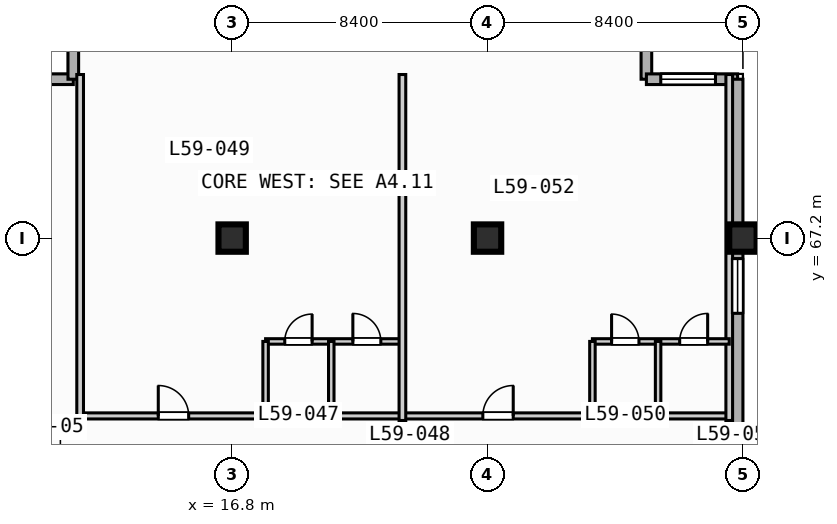
"""IFC4 building model, lengths in metres.
Left out: names, types, materials, properties, quantities, classifications, styles, units other than length and angle.
Written with IfcOpenShell. Run it as: python <this file> out.ifc"""

import sys

from ifc_helpers import new_model, si_unit, direction, frame, frame_2d, origin, origin_2d, place, context, subcontext, project, spatial, rectangle, extrude, element, fill, save


model = new_model("IFC4")
c1 = context("Model", 3, precision=1e-05, world=origin(), true_north=direction((0.0, 1.0)))
c2 = subcontext(c1, "Body", "Model", "MODEL_VIEW")
j1 = project(units=[si_unit("LENGTHUNIT", "METRE"), si_unit("PLANEANGLEUNIT", "RADIAN")], contexts=[c1])
p1 = place(None, origin())
s1 = spatial("IfcSite", under=j1, at=p1, CompositionType="ELEMENT")
p2 = place(p1, origin())
s2 = spatial("IfcBuilding", under=s1, at=p2, CompositionType="ELEMENT")
p3 = place(p2, frame((0.0, 0.0, 241.6)))
s3 = spatial("IfcBuildingStorey", under=s2, at=p3, CompositionType="ELEMENT", Elevation=241.6)
for number, where, z_axis, x_axis in (
    (1, (16.8, 67.2, 0.0), (0.0, 0.0, 1.0), (1.0, 0.0, 0.0)),
    (2, (25.2, 67.2, 0.0), (0.0, 0.0, 1.0), (1.0, 0.0, 0.0)),
    (3, (33.6, 67.2, 0.0), (0.0, 0.0, 1.0), (1.0, 0.0, 0.0)),
):
    element("IfcColumn", number, at=place(p3, frame(where, z_axis=z_axis, x_axis=x_axis)), inside=s3, PredefinedType="COLUMN", context=c2, shape_type="SweptSolid", body=[
        extrude(rectangle(XDim=0.9, YDim=0.9, at=origin_2d()), origin(), (0.0, 0.0, 1.0), 3.7),
    ])
for number, where, z_axis, x_axis in (
    (4, (8.575, 72.425, 0.0), (0.0, 0.0, 1.0), (1.0, 0.0, 0.0)),
    (5, (11.575, 72.425, 0.0), (0.0, 0.0, 1.0), (0.0, 1.0, 0.0)),
    (6, (30.425, 75.425, 0.0), (0.0, 0.0, 1.0), (0.0, -1.0, 0.0)),
):
    element("IfcWall", number, at=place(p3, frame(where, z_axis=z_axis, x_axis=x_axis)), inside=s3, PredefinedType="STANDARD", context=c2, shape_type="SweptSolid", body=[
        extrude(rectangle(XDim=3.0, YDim=0.35, at=frame_2d((1.5, 0.0))), origin(), (0.0, 0.0, 1.0), 3.47),
    ])
p4 = place(p3, frame((30.425, 72.425, 0.0), z_axis=(0.0, 0.0, 1.0), x_axis=(1.0, 0.0, 0.0)))
e7 = element("IfcWall", 7, at=p4, inside=s3, PredefinedType="STANDARD", context=c2, shape_type="SweptSolid", body=[
    extrude(rectangle(XDim=3.0, YDim=0.35, at=frame_2d((1.5, 0.0))), origin(), (0.0, 0.0, 1.0), 3.47),
])
p5 = place(p4, frame((0.472, 0.0, 0.85)))
e8 = element("IfcOpeningElement", 8, at=p5, cuts=e7, PredefinedType="OPENING", context=c2, shape_type="SweptSolid", body=[
    extrude(rectangle(XDim=1.8, YDim=1.8, at=frame_2d((0.9, 0.9))), frame((0.0, 0.185, 0.0), z_axis=(0.0, -1.0, 0.0), x_axis=(1.0, 0.0, 0.0)), (0.0, 0.0, 1.0), 0.37),
])
p6 = place(p3, frame((33.425, 72.425, 0.0), z_axis=(0.0, 0.0, 1.0), x_axis=(0.0, -1.0, 0.0)))
e9 = element("IfcWall", 9, at=p6, inside=s3, PredefinedType="STANDARD", context=c2, shape_type="SweptSolid", body=[
    extrude(rectangle(XDim=39.0, YDim=0.35, at=frame_2d((19.5, 0.0))), origin(), (0.0, 0.0, 1.0), 3.47),
])
p7 = place(p6, frame((5.9, 0.0, 0.85)))
e10 = element("IfcOpeningElement", 10, at=p7, cuts=e9, PredefinedType="OPENING", context=c2, shape_type="SweptSolid", body=[
    extrude(rectangle(XDim=1.8, YDim=1.8, at=frame_2d((0.9, 0.9))), frame((0.0, 0.185, 0.0), z_axis=(0.0, -1.0, 0.0), x_axis=(1.0, 0.0, 0.0)), (0.0, 0.0, 1.0), 0.37),
])
p8 = place(p3, frame((11.8, 61.35, 0.0), z_axis=(0.0, 0.0, 1.0), x_axis=(1.0, 0.0, 0.0)))
e11 = element("IfcWall", 11, at=p8, inside=s3, PredefinedType="PARTITIONING", context=c2, shape_type="SweptSolid", body=[
    extrude(rectangle(XDim=21.35, YDim=0.2, at=frame_2d((10.675, 0.0))), origin(), (0.0, 0.0, 1.0), 3.47),
])
p9 = place(p8, frame((2.57, 0.0, 0.0)))
e12 = element("IfcOpeningElement", 12, at=p9, cuts=e11, PredefinedType="OPENING", context=c2, shape_type="SweptSolid", body=[
    extrude(rectangle(XDim=1.0, YDim=2.15, at=frame_2d((0.5, 1.075))), frame((0.0, 0.11, 0.0), z_axis=(0.0, -1.0, 0.0), x_axis=(1.0, 0.0, 0.0)), (0.0, 0.0, 1.0), 0.22),
])
p10 = place(p8, frame((13.245, 0.0, 0.0)))
e13 = element("IfcOpeningElement", 13, at=p10, cuts=e11, PredefinedType="OPENING", context=c2, shape_type="SweptSolid", body=[
    extrude(rectangle(XDim=1.0, YDim=2.15, at=frame_2d((0.5, 1.075))), frame((0.0, 0.11, 0.0), z_axis=(0.0, -1.0, 0.0), x_axis=(1.0, 0.0, 0.0)), (0.0, 0.0, 1.0), 0.22),
])
p11 = place(p3, frame((11.8, 61.2, 0.0), z_axis=(0.0, 0.0, 1.0), x_axis=(0.0, 1.0, 0.0)))
e14 = element("IfcWall", 14, at=p11, inside=s3, PredefinedType="PARTITIONING", context=c2, shape_type="SweptSolid", body=[
    extrude(rectangle(XDim=11.38, YDim=0.22, at=frame_2d((5.69, 0.0))), origin(), (0.0, 0.0, 1.0), 3.47),
])
p12 = place(p3, frame((17.9, 63.8, 0.0), z_axis=(0.0, 0.0, 1.0), x_axis=(1.0, 0.0, 0.0)))
e15 = element("IfcWall", 15, at=p12, inside=s3, PredefinedType="PLUMBINGWALL", context=c2, shape_type="SweptSolid", body=[
    extrude(rectangle(XDim=4.5, YDim=0.18, at=frame_2d((2.25, 0.0))), origin(), (0.0, 0.0, 1.0), 3.47),
])
p13 = place(p12, frame((0.63, 0.0, 0.0)))
e16 = element("IfcOpeningElement", 16, at=p13, cuts=e15, PredefinedType="OPENING", context=c2, shape_type="SweptSolid", body=[
    extrude(rectangle(XDim=0.9, YDim=2.1, at=frame_2d((0.45, 1.05))), frame((0.0, 0.1, 0.0), z_axis=(0.0, -1.0, 0.0), x_axis=(1.0, 0.0, 0.0)), (0.0, 0.0, 1.0), 0.2),
])
p14 = place(p12, frame((2.87, 0.0, 0.0)))
e17 = element("IfcOpeningElement", 17, at=p14, cuts=e15, PredefinedType="OPENING", context=c2, shape_type="SweptSolid", body=[
    extrude(rectangle(XDim=0.92, YDim=2.1, at=frame_2d((0.46, 1.05))), frame((0.0, 0.1, 0.0), z_axis=(0.0, -1.0, 0.0), x_axis=(1.0, 0.0, 0.0)), (0.0, 0.0, 1.0), 0.2),
])
for number, where, z_axis, x_axis in (
    (18, (17.9, 61.35, 0.0), (0.0, 0.0, 1.0), (0.0, 1.0, 0.0)),
    (19, (20.06, 61.35, 0.0), (0.0, 0.0, 1.0), (0.0, 1.0, 0.0)),
):
    element("IfcWall", number, at=place(p3, frame(where, z_axis=z_axis, x_axis=x_axis)), inside=s3, PredefinedType="PLUMBINGWALL", context=c2, shape_type="SweptSolid", body=[
        extrude(rectangle(XDim=2.45, YDim=0.18, at=frame_2d((1.225, 0.0))), origin(), (0.0, 0.0, 1.0), 3.47),
    ])
for number, where, z_axis, x_axis in (
    (20, (22.4, 61.2, 0.0), (0.0, 0.0, 1.0), (0.0, 1.0, 0.0)),
    (21, (33.15, 61.2, 0.0), (0.0, 0.0, 1.0), (0.0, 1.0, 0.0)),
):
    element("IfcWall", number, at=place(p3, frame(where, z_axis=z_axis, x_axis=x_axis)), inside=s3, PredefinedType="PARTITIONING", context=c2, shape_type="SweptSolid", body=[
        extrude(rectangle(XDim=11.38, YDim=0.22, at=frame_2d((5.69, 0.0))), origin(), (0.0, 0.0, 1.0), 3.47),
    ])
p15 = place(p3, frame((28.65, 63.8, 0.0), z_axis=(0.0, 0.0, 1.0), x_axis=(1.0, 0.0, 0.0)))
e22 = element("IfcWall", 22, at=p15, inside=s3, PredefinedType="PLUMBINGWALL", context=c2, shape_type="SweptSolid", body=[
    extrude(rectangle(XDim=4.5, YDim=0.18, at=frame_2d((2.25, 0.0))), origin(), (0.0, 0.0, 1.0), 3.47),
])
p16 = place(p15, frame((0.63, 0.0, 0.0)))
e23 = element("IfcOpeningElement", 23, at=p16, cuts=e22, PredefinedType="OPENING", context=c2, shape_type="SweptSolid", body=[
    extrude(rectangle(XDim=0.9, YDim=2.1, at=frame_2d((0.45, 1.05))), frame((0.0, 0.1, 0.0), z_axis=(0.0, -1.0, 0.0), x_axis=(1.0, 0.0, 0.0)), (0.0, 0.0, 1.0), 0.2),
])
p17 = place(p15, frame((2.87, 0.0, 0.0)))
e24 = element("IfcOpeningElement", 24, at=p17, cuts=e22, PredefinedType="OPENING", context=c2, shape_type="SweptSolid", body=[
    extrude(rectangle(XDim=0.92, YDim=2.1, at=frame_2d((0.46, 1.05))), frame((0.0, 0.1, 0.0), z_axis=(0.0, -1.0, 0.0), x_axis=(1.0, 0.0, 0.0)), (0.0, 0.0, 1.0), 0.2),
])
for number, where, z_axis, x_axis in (
    (25, (28.65, 61.35, 0.0), (0.0, 0.0, 1.0), (0.0, 1.0, 0.0)),
    (26, (30.81, 61.35, 0.0), (0.0, 0.0, 1.0), (0.0, 1.0, 0.0)),
):
    element("IfcWall", number, at=place(p3, frame(where, z_axis=z_axis, x_axis=x_axis)), inside=s3, PredefinedType="PLUMBINGWALL", context=c2, shape_type="SweptSolid", body=[
        extrude(rectangle(XDim=2.45, YDim=0.18, at=frame_2d((1.225, 0.0))), origin(), (0.0, 0.0, 1.0), 3.47),
    ])
p18 = place(p5, origin())
e27 = element("IfcWindow", 27, at=p18, inside=s3, PartitioningType="SINGLE_PANEL", PredefinedType="WINDOW", context=c2, shape_type="SweptSolid", body=[
    extrude(rectangle(XDim=1.8, YDim=1.8, at=frame_2d((0.9, 0.9))), frame((0.0, 0.03, 0.0), z_axis=(0.0, -1.0, 0.0), x_axis=(1.0, 0.0, 0.0)), (0.0, 0.0, 1.0), 0.06),
])
fill(e8, e27)
p19 = place(p7, origin())
e28 = element("IfcWindow", 28, at=p19, inside=s3, PartitioningType="SINGLE_PANEL", PredefinedType="WINDOW", context=c2, shape_type="SweptSolid", body=[
    extrude(rectangle(XDim=1.8, YDim=1.8, at=frame_2d((0.9, 0.9))), frame((0.0, 0.03, 0.0), z_axis=(0.0, -1.0, 0.0), x_axis=(1.0, 0.0, 0.0)), (0.0, 0.0, 1.0), 0.06),
])
fill(e10, e28)
p20 = place(p9, origin())
e29 = element("IfcDoor", 29, at=p20, inside=s3, OperationType="SINGLE_SWING_LEFT", PredefinedType="DOOR", context=c2, shape_type="SweptSolid", body=[
    extrude(rectangle(XDim=1.0, YDim=2.15, at=frame_2d((0.5, 1.075))), frame((0.0, 0.025, 0.0), z_axis=(0.0, -1.0, 0.0), x_axis=(1.0, 0.0, 0.0)), (0.0, 0.0, 1.0), 0.05),
])
fill(e12, e29)
p21 = place(p10, origin())
e30 = element("IfcDoor", 30, at=p21, inside=s3, OperationType="SINGLE_SWING_RIGHT", PredefinedType="DOOR", context=c2, shape_type="SweptSolid", body=[
    extrude(rectangle(XDim=1.0, YDim=2.15, at=frame_2d((0.5, 1.075))), frame((0.0, 0.025, 0.0), z_axis=(0.0, -1.0, 0.0), x_axis=(1.0, 0.0, 0.0)), (0.0, 0.0, 1.0), 0.05),
])
fill(e13, e30)
p22 = place(p13, origin())
e31 = element("IfcDoor", 31, at=p22, inside=s3, OperationType="SINGLE_SWING_RIGHT", PredefinedType="DOOR", context=c2, shape_type="SweptSolid", body=[
    extrude(rectangle(XDim=0.9, YDim=2.1, at=frame_2d((0.45, 1.05))), frame((0.0, 0.025, 0.0), z_axis=(0.0, -1.0, 0.0), x_axis=(1.0, 0.0, 0.0)), (0.0, 0.0, 1.0), 0.05),
])
fill(e16, e31)
p23 = place(p14, origin())
e32 = element("IfcDoor", 32, at=p23, inside=s3, OperationType="SINGLE_SWING_LEFT", PredefinedType="DOOR", context=c2, shape_type="SweptSolid", body=[
    extrude(rectangle(XDim=0.92, YDim=2.1, at=frame_2d((0.46, 1.05))), frame((0.0, 0.025, 0.0), z_axis=(0.0, -1.0, 0.0), x_axis=(1.0, 0.0, 0.0)), (0.0, 0.0, 1.0), 0.05),
])
fill(e17, e32)
p24 = place(p16, origin())
e33 = element("IfcDoor", 33, at=p24, inside=s3, OperationType="SINGLE_SWING_LEFT", PredefinedType="DOOR", context=c2, shape_type="SweptSolid", body=[
    extrude(rectangle(XDim=0.9, YDim=2.1, at=frame_2d((0.45, 1.05))), frame((0.0, 0.025, 0.0), z_axis=(0.0, -1.0, 0.0), x_axis=(1.0, 0.0, 0.0)), (0.0, 0.0, 1.0), 0.05),
])
fill(e23, e33)
p25 = place(p17, origin())
e34 = element("IfcDoor", 34, at=p25, inside=s3, OperationType="SINGLE_SWING_RIGHT", PredefinedType="DOOR", context=c2, shape_type="SweptSolid", body=[
    extrude(rectangle(XDim=0.92, YDim=2.1, at=frame_2d((0.46, 1.05))), frame((0.0, 0.025, 0.0), z_axis=(0.0, -1.0, 0.0), x_axis=(1.0, 0.0, 0.0)), (0.0, 0.0, 1.0), 0.05),
])
fill(e24, e34)
save(model, sys.argv[1])
